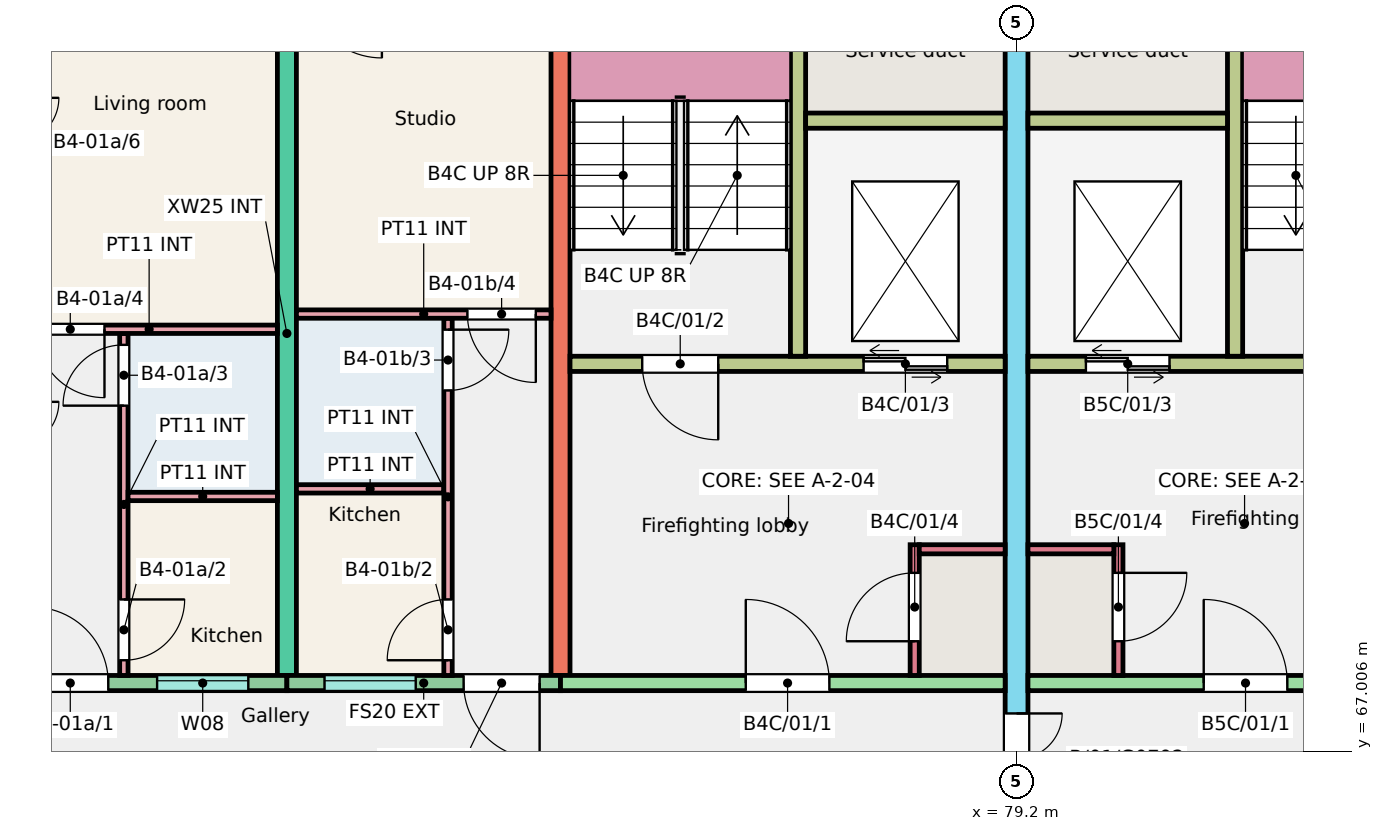
"""IFC4 building model, lengths in metres.
Left out: names, types, materials, properties, quantities, classifications, styles, units other than length and angle.
Written with IfcOpenShell. Run it as: python <this file> out.ifc"""

import sys

from ifc_helpers import new_model, si_unit, direction, frame, frame_2d, origin, place, context, subcontext, project, spatial, rectangle, extrude, element, fill, save


model = new_model("IFC4")
c1 = context("Model", 3, precision=1e-05, world=origin(), true_north=direction((0.0, 1.0)))
c2 = subcontext(c1, "Body", "Model", "MODEL_VIEW")
j1 = project(units=[si_unit("LENGTHUNIT", "METRE"), si_unit("PLANEANGLEUNIT", "RADIAN")], contexts=[c1])
p1 = place(None, origin())
s1 = spatial("IfcSite", under=j1, at=p1, CompositionType="ELEMENT")
p2 = place(p1, origin())
s2 = spatial("IfcBuilding", under=s1, at=p2, CompositionType="ELEMENT")
p3 = place(p2, frame((0.0, 0.0, 3.0)))
s3 = spatial("IfcBuildingStorey", under=s2, at=p3, CompositionType="ELEMENT", Elevation=3.0)
for number, where, z_axis, x_axis in (
    (1, (69.6, 68.0, 0.0), (0.0, 0.0, 1.0), (0.0, 1.0, 0.0)),
    (2, (73.2, 68.0, 0.0), (0.0, 0.0, 1.0), (0.0, 1.0, 0.0)),
):
    element("IfcWall", number, at=place(p3, frame(where, z_axis=z_axis, x_axis=x_axis)), inside=s3, PredefinedType="SHEAR", context=c2, shape_type="SweptSolid", body=[
        extrude(rectangle(XDim=9.0, YDim=0.25, at=frame_2d((4.5, 0.0))), origin(), (0.0, 0.0, 1.0), 3.0),
    ])
p4 = place(p3, frame((79.2, 66.0, 0.0), z_axis=(0.0, 0.0, 1.0), x_axis=(0.0, 1.0, 0.0)))
e3 = element("IfcWall", 3, at=p4, inside=s3, PredefinedType="SHEAR", context=c2, shape_type="SweptSolid", body=[
    extrude(rectangle(XDim=11.0, YDim=0.3, at=frame_2d((5.5, 0.0))), origin(), (0.0, 0.0, 1.0), 3.0),
])
p5 = place(p4, frame((0.3, 0.0, 0.0)))
e4 = element("IfcOpeningElement", 4, at=p5, cuts=e3, PredefinedType="OPENING", context=c2, shape_type="SweptSolid", body=[
    extrude(rectangle(XDim=1.2, YDim=2.1, at=frame_2d((0.6, 1.05))), frame((0.0, 0.16, 0.0), z_axis=(0.0, -1.0, 0.0), x_axis=(1.0, 0.0, 0.0)), (0.0, 0.0, 1.0), 0.32),
])
p6 = place(p3, frame((66.0, 67.9, 0.0), z_axis=(0.0, 0.0, 1.0), x_axis=(1.0, 0.0, 0.0)))
e5 = element("IfcWall", 5, at=p6, inside=s3, PredefinedType="SOLIDWALL", context=c2, shape_type="SweptSolid", body=[
    extrude(rectangle(XDim=3.6, YDim=0.2, at=frame_2d((1.8, 0.0))), origin(), (0.0, 0.0, 1.0), 3.0),
])
p7 = place(p6, frame((1.893, 0.0, 1.1)))
e6 = element("IfcOpeningElement", 6, at=p7, cuts=e5, PredefinedType="OPENING", context=c2, shape_type="SweptSolid", body=[
    extrude(rectangle(XDim=1.2, YDim=1.3, at=frame_2d((0.6, 0.65))), frame((0.0, 0.11, 0.0), z_axis=(0.0, -1.0, 0.0), x_axis=(1.0, 0.0, 0.0)), (0.0, 0.0, 1.0), 0.22),
])
p8 = place(p6, frame((0.25, 0.0, 0.0)))
e7 = element("IfcOpeningElement", 7, at=p8, cuts=e5, PredefinedType="OPENING", context=c2, shape_type="SweptSolid", body=[
    extrude(rectangle(XDim=1.0, YDim=2.1, at=frame_2d((0.5, 1.05))), frame((0.0, 0.11, 0.0), z_axis=(0.0, -1.0, 0.0), x_axis=(1.0, 0.0, 0.0)), (0.0, 0.0, 1.0), 0.22),
])
p9 = place(p3, frame((69.6, 67.9, 0.0), z_axis=(0.0, 0.0, 1.0), x_axis=(1.0, 0.0, 0.0)))
e8 = element("IfcWall", 8, at=p9, inside=s3, PredefinedType="SOLIDWALL", context=c2, shape_type="SweptSolid", body=[
    extrude(rectangle(XDim=3.6, YDim=0.2, at=frame_2d((1.8, 0.0))), origin(), (0.0, 0.0, 1.0), 3.0),
])
p10 = place(p9, frame((0.495, 0.0, 1.1)))
e9 = element("IfcOpeningElement", 9, at=p10, cuts=e8, PredefinedType="OPENING", context=c2, shape_type="SweptSolid", body=[
    extrude(rectangle(XDim=1.2, YDim=1.3, at=frame_2d((0.6, 0.65))), frame((0.0, 0.11, 0.0), z_axis=(0.0, -1.0, 0.0), x_axis=(1.0, 0.0, 0.0)), (0.0, 0.0, 1.0), 0.22),
])
p11 = place(p9, frame((2.325, 0.0, 0.0)))
e10 = element("IfcOpeningElement", 10, at=p11, cuts=e8, PredefinedType="OPENING", context=c2, shape_type="SweptSolid", body=[
    extrude(rectangle(XDim=1.0, YDim=2.1, at=frame_2d((0.5, 1.05))), frame((0.0, 0.11, 0.0), z_axis=(0.0, -1.0, 0.0), x_axis=(1.0, 0.0, 0.0)), (0.0, 0.0, 1.0), 0.22),
])
p12 = place(p3, frame((73.2, 67.9, 0.0), z_axis=(0.0, 0.0, 1.0), x_axis=(1.0, 0.0, 0.0)))
e11 = element("IfcWall", 11, at=p12, inside=s3, PredefinedType="SHEAR", context=c2, shape_type="SweptSolid", body=[
    extrude(rectangle(XDim=5.85, YDim=0.2, at=frame_2d((2.925, 0.0))), origin(), (0.0, 0.0, 1.0), 3.0),
])
p13 = place(p12, frame((2.438, 0.0, 0.0)))
e12 = element("IfcOpeningElement", 12, at=p13, cuts=e11, PredefinedType="OPENING", context=c2, shape_type="SweptSolid", body=[
    extrude(rectangle(XDim=1.1, YDim=2.1, at=frame_2d((0.55, 1.05))), frame((0.0, 0.11, 0.0), z_axis=(0.0, -1.0, 0.0), x_axis=(1.0, 0.0, 0.0)), (0.0, 0.0, 1.0), 0.22),
])
p14 = place(p3, frame((73.325, 72.1, 0.0), z_axis=(0.0, 0.0, 1.0), x_axis=(1.0, 0.0, 0.0)))
e13 = element("IfcWall", 13, at=p14, inside=s3, PredefinedType="SHEAR", context=c2, shape_type="SweptSolid", body=[
    extrude(rectangle(XDim=5.725, YDim=0.2, at=frame_2d((2.863, 0.0))), origin(), (0.0, 0.0, 1.0), 3.0),
])
p15 = place(p14, frame((0.95, 0.0, 0.0)))
e14 = element("IfcOpeningElement", 14, at=p15, cuts=e13, PredefinedType="OPENING", context=c2, shape_type="SweptSolid", body=[
    extrude(rectangle(XDim=1.0, YDim=2.1, at=frame_2d((0.5, 1.05))), frame((0.0, 0.11, 0.0), z_axis=(0.0, -1.0, 0.0), x_axis=(1.0, 0.0, 0.0)), (0.0, 0.0, 1.0), 0.22),
])
p16 = place(p14, frame((3.863, 0.0, 0.0)))
e15 = element("IfcOpeningElement", 15, at=p16, cuts=e13, PredefinedType="OPENING", context=c2, shape_type="SweptSolid", body=[
    extrude(rectangle(XDim=1.1, YDim=2.1, at=frame_2d((0.55, 1.05))), frame((0.0, 0.11, 0.0), z_axis=(0.0, -1.0, 0.0), x_axis=(1.0, 0.0, 0.0)), (0.0, 0.0, 1.0), 0.22),
])
p17 = place(p3, frame((76.325, 72.2, 0.0), z_axis=(0.0, 0.0, 1.0), x_axis=(0.0, 1.0, 0.0)))
e16 = element("IfcWall", 16, at=p17, inside=s3, PredefinedType="SHEAR", context=c2, shape_type="SweptSolid", body=[
    extrude(rectangle(XDim=4.8, YDim=0.2, at=frame_2d((2.4, 0.0))), origin(), (0.0, 0.0, 1.0), 3.0),
])
p18 = place(p3, frame((76.425, 75.3, 0.0), z_axis=(0.0, 0.0, 1.0), x_axis=(1.0, 0.0, 0.0)))
e17 = element("IfcWall", 17, at=p18, inside=s3, PredefinedType="SHEAR", context=c2, shape_type="SweptSolid", body=[
    extrude(rectangle(XDim=2.625, YDim=0.2, at=frame_2d((1.312, 0.0))), origin(), (0.0, 0.0, 1.0), 3.0),
])
p19 = place(p3, frame((77.86, 68.0, 0.0), z_axis=(0.0, 0.0, 1.0), x_axis=(0.0, 1.0, 0.0)))
e18 = element("IfcWall", 18, at=p19, inside=s3, PredefinedType="SHEAR", context=c2, shape_type="SweptSolid", body=[
    extrude(rectangle(XDim=1.72, YDim=0.12, at=frame_2d((0.86, 0.0))), origin(), (0.0, 0.0, 1.0), 3.0),
])
p20 = place(p19, frame((0.45, 0.0, 0.0)))
e19 = element("IfcOpeningElement", 19, at=p20, cuts=e18, PredefinedType="OPENING", context=c2, shape_type="SweptSolid", body=[
    extrude(rectangle(XDim=0.9, YDim=2.1, at=frame_2d((0.45, 1.05))), frame((0.0, 0.07, 0.0), z_axis=(0.0, -1.0, 0.0), x_axis=(1.0, 0.0, 0.0)), (0.0, 0.0, 1.0), 0.14),
])
p21 = place(p3, frame((77.92, 69.66, 0.0), z_axis=(0.0, 0.0, 1.0), x_axis=(1.0, 0.0, 0.0)))
e20 = element("IfcWall", 20, at=p21, inside=s3, PredefinedType="SHEAR", context=c2, shape_type="SweptSolid", body=[
    extrude(rectangle(XDim=1.13, YDim=0.12, at=frame_2d((0.565, 0.0))), origin(), (0.0, 0.0, 1.0), 3.0),
])
p22 = place(p3, frame((79.35, 67.9, 0.0), z_axis=(0.0, 0.0, 1.0), x_axis=(1.0, 0.0, 0.0)))
e21 = element("IfcWall", 21, at=p22, inside=s3, PredefinedType="SHEAR", context=c2, shape_type="SweptSolid", body=[
    extrude(rectangle(XDim=5.85, YDim=0.2, at=frame_2d((2.925, 0.0))), origin(), (0.0, 0.0, 1.0), 3.0),
])
p23 = place(p22, frame((2.312, 0.0, 0.0)))
e22 = element("IfcOpeningElement", 22, at=p23, cuts=e21, PredefinedType="OPENING", context=c2, shape_type="SweptSolid", body=[
    extrude(rectangle(XDim=1.1, YDim=2.1, at=frame_2d((0.55, 1.05))), frame((0.0, 0.11, 0.0), z_axis=(0.0, -1.0, 0.0), x_axis=(1.0, 0.0, 0.0)), (0.0, 0.0, 1.0), 0.22),
])
p24 = place(p3, frame((79.35, 72.1, 0.0), z_axis=(0.0, 0.0, 1.0), x_axis=(1.0, 0.0, 0.0)))
e23 = element("IfcWall", 23, at=p24, inside=s3, PredefinedType="SHEAR", context=c2, shape_type="SweptSolid", body=[
    extrude(rectangle(XDim=5.725, YDim=0.2, at=frame_2d((2.862, 0.0))), origin(), (0.0, 0.0, 1.0), 3.0),
])
p25 = place(p24, frame((3.775, 0.0, 0.0)))
e24 = element("IfcOpeningElement", 24, at=p25, cuts=e23, PredefinedType="OPENING", context=c2, shape_type="SweptSolid", body=[
    extrude(rectangle(XDim=1.0, YDim=2.1, at=frame_2d((0.5, 1.05))), frame((0.0, 0.11, 0.0), z_axis=(0.0, -1.0, 0.0), x_axis=(1.0, 0.0, 0.0)), (0.0, 0.0, 1.0), 0.22),
])
p26 = place(p24, frame((0.762, 0.0, 0.0)))
e25 = element("IfcOpeningElement", 25, at=p26, cuts=e23, PredefinedType="OPENING", context=c2, shape_type="SweptSolid", body=[
    extrude(rectangle(XDim=1.1, YDim=2.1, at=frame_2d((0.55, 1.05))), frame((0.0, 0.11, 0.0), z_axis=(0.0, -1.0, 0.0), x_axis=(1.0, 0.0, 0.0)), (0.0, 0.0, 1.0), 0.22),
])
p27 = place(p3, frame((82.075, 72.2, 0.0), z_axis=(0.0, 0.0, 1.0), x_axis=(0.0, 1.0, 0.0)))
e26 = element("IfcWall", 26, at=p27, inside=s3, PredefinedType="SHEAR", context=c2, shape_type="SweptSolid", body=[
    extrude(rectangle(XDim=4.8, YDim=0.2, at=frame_2d((2.4, 0.0))), origin(), (0.0, 0.0, 1.0), 3.0),
])
p28 = place(p3, frame((79.35, 75.3, 0.0), z_axis=(0.0, 0.0, 1.0), x_axis=(1.0, 0.0, 0.0)))
e27 = element("IfcWall", 27, at=p28, inside=s3, PredefinedType="SHEAR", context=c2, shape_type="SweptSolid", body=[
    extrude(rectangle(XDim=2.625, YDim=0.2, at=frame_2d((1.312, 0.0))), origin(), (0.0, 0.0, 1.0), 3.0),
])
p29 = place(p3, frame((80.54, 68.0, 0.0), z_axis=(0.0, 0.0, 1.0), x_axis=(0.0, 1.0, 0.0)))
e28 = element("IfcWall", 28, at=p29, inside=s3, PredefinedType="SHEAR", context=c2, shape_type="SweptSolid", body=[
    extrude(rectangle(XDim=1.72, YDim=0.12, at=frame_2d((0.86, 0.0))), origin(), (0.0, 0.0, 1.0), 3.0),
])
p30 = place(p29, frame((0.45, 0.0, 0.0)))
e29 = element("IfcOpeningElement", 29, at=p30, cuts=e28, PredefinedType="OPENING", context=c2, shape_type="SweptSolid", body=[
    extrude(rectangle(XDim=0.9, YDim=2.1, at=frame_2d((0.45, 1.05))), frame((0.0, 0.07, 0.0), z_axis=(0.0, -1.0, 0.0), x_axis=(1.0, 0.0, 0.0)), (0.0, 0.0, 1.0), 0.14),
])
p31 = place(p3, frame((79.35, 69.66, 0.0), z_axis=(0.0, 0.0, 1.0), x_axis=(1.0, 0.0, 0.0)))
e30 = element("IfcWall", 30, at=p31, inside=s3, PredefinedType="SHEAR", context=c2, shape_type="SweptSolid", body=[
    extrude(rectangle(XDim=1.13, YDim=0.12, at=frame_2d((0.565, 0.0))), origin(), (0.0, 0.0, 1.0), 3.0),
])
p32 = place(p3, frame((67.455, 68.0, 0.0), z_axis=(0.0, 0.0, 1.0), x_axis=(0.0, 1.0, 0.0)))
e31 = element("IfcWall", 31, at=p32, inside=s3, PredefinedType="PARTITIONING", context=c2, shape_type="SweptSolid", body=[
    extrude(rectangle(XDim=4.5, YDim=0.11, at=frame_2d((2.25, 0.0))), origin(), (0.0, 0.0, 1.0), 2.8),
])
p33 = place(p32, frame((0.2, 0.0, 0.0)))
e32 = element("IfcOpeningElement", 32, at=p33, cuts=e31, PredefinedType="OPENING", context=c2, shape_type="SweptSolid", body=[
    extrude(rectangle(XDim=0.8, YDim=2.1, at=frame_2d((0.4, 1.05))), frame((0.0, 0.065, 0.0), z_axis=(0.0, -1.0, 0.0), x_axis=(1.0, 0.0, 0.0)), (0.0, 0.0, 1.0), 0.13),
])
p34 = place(p32, frame((3.55, 0.0, 0.0)))
e33 = element("IfcOpeningElement", 33, at=p34, cuts=e31, PredefinedType="OPENING", context=c2, shape_type="SweptSolid", body=[
    extrude(rectangle(XDim=0.8, YDim=2.1, at=frame_2d((0.4, 1.05))), frame((0.0, 0.065, 0.0), z_axis=(0.0, -1.0, 0.0), x_axis=(1.0, 0.0, 0.0)), (0.0, 0.0, 1.0), 0.13),
])
p35 = place(p3, frame((67.51, 70.355, 0.0), z_axis=(0.0, 0.0, 1.0), x_axis=(1.0, 0.0, 0.0)))
e34 = element("IfcWall", 34, at=p35, inside=s3, PredefinedType="PARTITIONING", context=c2, shape_type="SweptSolid", body=[
    extrude(rectangle(XDim=1.965, YDim=0.11, at=frame_2d((0.982, 0.0))), origin(), (0.0, 0.0, 1.0), 2.8),
])
p36 = place(p3, frame((66.1, 72.555, 0.0), z_axis=(0.0, 0.0, 1.0), x_axis=(1.0, 0.0, 0.0)))
e35 = element("IfcWall", 35, at=p36, inside=s3, PredefinedType="PARTITIONING", context=c2, shape_type="SweptSolid", body=[
    extrude(rectangle(XDim=3.375, YDim=0.11, at=frame_2d((1.688, 0.0))), origin(), (0.0, 0.0, 1.0), 2.8),
])
p37 = place(p36, frame((0.2, 0.0, 0.0)))
e36 = element("IfcOpeningElement", 36, at=p37, cuts=e35, PredefinedType="OPENING", context=c2, shape_type="SweptSolid", body=[
    extrude(rectangle(XDim=0.9, YDim=2.1, at=frame_2d((0.45, 1.05))), frame((0.0, 0.065, 0.0), z_axis=(0.0, -1.0, 0.0), x_axis=(1.0, 0.0, 0.0)), (0.0, 0.0, 1.0), 0.13),
])
p38 = place(p3, frame((69.725, 70.455, 0.0), z_axis=(0.0, 0.0, 1.0), x_axis=(1.0, 0.0, 0.0)))
e37 = element("IfcWall", 37, at=p38, inside=s3, PredefinedType="PARTITIONING", context=c2, shape_type="SweptSolid", body=[
    extrude(rectangle(XDim=1.94, YDim=0.11, at=frame_2d((0.97, 0.0))), origin(), (0.0, 0.0, 1.0), 2.8),
])
p39 = place(p3, frame((71.72, 68.0, 0.0), z_axis=(0.0, 0.0, 1.0), x_axis=(0.0, 1.0, 0.0)))
e38 = element("IfcWall", 38, at=p39, inside=s3, PredefinedType="PARTITIONING", context=c2, shape_type="SweptSolid", body=[
    extrude(rectangle(XDim=4.7, YDim=0.11, at=frame_2d((2.35, 0.0))), origin(), (0.0, 0.0, 1.0), 2.8),
])
p40 = place(p39, frame((0.2, 0.0, 0.0)))
e39 = element("IfcOpeningElement", 39, at=p40, cuts=e38, PredefinedType="OPENING", context=c2, shape_type="SweptSolid", body=[
    extrude(rectangle(XDim=0.8, YDim=2.1, at=frame_2d((0.4, 1.05))), frame((0.0, 0.065, 0.0), z_axis=(0.0, -1.0, 0.0), x_axis=(1.0, 0.0, 0.0)), (0.0, 0.0, 1.0), 0.13),
])
p41 = place(p39, frame((3.75, 0.0, 0.0)))
e40 = element("IfcOpeningElement", 40, at=p41, cuts=e38, PredefinedType="OPENING", context=c2, shape_type="SweptSolid", body=[
    extrude(rectangle(XDim=0.8, YDim=2.1, at=frame_2d((0.4, 1.05))), frame((0.0, 0.065, 0.0), z_axis=(0.0, -1.0, 0.0), x_axis=(1.0, 0.0, 0.0)), (0.0, 0.0, 1.0), 0.13),
])
p42 = place(p3, frame((69.725, 72.755, 0.0), z_axis=(0.0, 0.0, 1.0), x_axis=(1.0, 0.0, 0.0)))
e41 = element("IfcWall", 41, at=p42, inside=s3, PredefinedType="PARTITIONING", context=c2, shape_type="SweptSolid", body=[
    extrude(rectangle(XDim=3.35, YDim=0.11, at=frame_2d((1.675, 0.0))), origin(), (0.0, 0.0, 1.0), 2.8),
])
p43 = place(p42, frame((2.25, 0.0, 0.0)))
e42 = element("IfcOpeningElement", 42, at=p43, cuts=e41, PredefinedType="OPENING", context=c2, shape_type="SweptSolid", body=[
    extrude(rectangle(XDim=0.9, YDim=2.1, at=frame_2d((0.45, 1.05))), frame((0.0, 0.065, 0.0), z_axis=(0.0, -1.0, 0.0), x_axis=(1.0, 0.0, 0.0)), (0.0, 0.0, 1.0), 0.13),
])
p44 = place(p7, origin())
e43 = element("IfcWindow", 43, at=p44, inside=s3, PartitioningType="SINGLE_PANEL", PredefinedType="WINDOW", context=c2, shape_type="SweptSolid", body=[
    extrude(rectangle(XDim=1.2, YDim=1.3, at=frame_2d((0.6, 0.65))), frame((0.0, 0.06, 0.0), z_axis=(0.0, -1.0, 0.0), x_axis=(1.0, 0.0, 0.0)), (0.0, 0.0, 1.0), 0.06),
])
fill(e6, e43)
p45 = place(p10, origin())
e44 = element("IfcWindow", 44, at=p45, inside=s3, PartitioningType="SINGLE_PANEL", PredefinedType="WINDOW", context=c2, shape_type="SweptSolid", body=[
    extrude(rectangle(XDim=1.2, YDim=1.3, at=frame_2d((0.6, 0.65))), frame((0.0, 0.06, 0.0), z_axis=(0.0, -1.0, 0.0), x_axis=(1.0, 0.0, 0.0)), (0.0, 0.0, 1.0), 0.06),
])
fill(e9, e44)
p46 = place(p8, origin())
e45 = element("IfcDoor", 45, at=p46, inside=s3, OperationType="SINGLE_SWING_LEFT", PredefinedType="DOOR", context=c2, shape_type="SweptSolid", body=[
    extrude(rectangle(XDim=1.0, YDim=2.1, at=frame_2d((0.5, 1.05))), frame((0.0, 0.025, 0.0), z_axis=(0.0, -1.0, 0.0), x_axis=(1.0, 0.0, 0.0)), (0.0, 0.0, 1.0), 0.05),
])
fill(e7, e45)
p47 = place(p33, origin())
e46 = element("IfcDoor", 46, at=p47, inside=s3, OperationType="SINGLE_SWING_RIGHT", PredefinedType="DOOR", context=c2, shape_type="SweptSolid", body=[
    extrude(rectangle(XDim=0.8, YDim=2.1, at=frame_2d((0.4, 1.05))), frame((0.0, 0.025, 0.0), z_axis=(0.0, -1.0, 0.0), x_axis=(1.0, 0.0, 0.0)), (0.0, 0.0, 1.0), 0.05),
])
fill(e32, e46)
p48 = place(p34, origin())
e47 = element("IfcDoor", 47, at=p48, inside=s3, OperationType="SINGLE_SWING_LEFT", PredefinedType="DOOR", context=c2, shape_type="SweptSolid", body=[
    extrude(rectangle(XDim=0.8, YDim=2.1, at=frame_2d((0.4, 1.05))), frame((0.0, 0.025, 0.0), z_axis=(0.0, -1.0, 0.0), x_axis=(1.0, 0.0, 0.0)), (0.0, 0.0, 1.0), 0.05),
])
fill(e33, e47)
p49 = place(p37, origin())
e48 = element("IfcDoor", 48, at=p49, inside=s3, OperationType="SINGLE_SWING_RIGHT", PredefinedType="DOOR", context=c2, shape_type="SweptSolid", body=[
    extrude(rectangle(XDim=0.9, YDim=2.1, at=frame_2d((0.45, 1.05))), frame((0.0, 0.025, 0.0), z_axis=(0.0, -1.0, 0.0), x_axis=(1.0, 0.0, 0.0)), (0.0, 0.0, 1.0), 0.05),
])
fill(e36, e48)
p50 = place(p11, origin())
e49 = element("IfcDoor", 49, at=p50, inside=s3, OperationType="SINGLE_SWING_RIGHT", PredefinedType="DOOR", context=c2, shape_type="SweptSolid", body=[
    extrude(rectangle(XDim=1.0, YDim=2.1, at=frame_2d((0.5, 1.05))), frame((0.0, 0.025, 0.0), z_axis=(0.0, -1.0, 0.0), x_axis=(1.0, 0.0, 0.0)), (0.0, 0.0, 1.0), 0.05),
])
fill(e10, e49)
p51 = place(p40, origin())
e50 = element("IfcDoor", 50, at=p51, inside=s3, OperationType="SINGLE_SWING_LEFT", PredefinedType="DOOR", context=c2, shape_type="SweptSolid", body=[
    extrude(rectangle(XDim=0.8, YDim=2.1, at=frame_2d((0.4, 1.05))), frame((0.0, 0.025, 0.0), z_axis=(0.0, -1.0, 0.0), x_axis=(1.0, 0.0, 0.0)), (0.0, 0.0, 1.0), 0.05),
])
fill(e39, e50)
p52 = place(p41, origin())
e51 = element("IfcDoor", 51, at=p52, inside=s3, OperationType="SINGLE_SWING_RIGHT", PredefinedType="DOOR", context=c2, shape_type="SweptSolid", body=[
    extrude(rectangle(XDim=0.8, YDim=2.1, at=frame_2d((0.4, 1.05))), frame((0.0, 0.025, 0.0), z_axis=(0.0, -1.0, 0.0), x_axis=(1.0, 0.0, 0.0)), (0.0, 0.0, 1.0), 0.05),
])
fill(e40, e51)
p53 = place(p43, origin())
e52 = element("IfcDoor", 52, at=p53, inside=s3, OperationType="SINGLE_SWING_RIGHT", PredefinedType="DOOR", context=c2, shape_type="SweptSolid", body=[
    extrude(rectangle(XDim=0.9, YDim=2.1, at=frame_2d((0.45, 1.05))), frame((0.0, 0.025, 0.0), z_axis=(0.0, -1.0, 0.0), x_axis=(1.0, 0.0, 0.0)), (0.0, 0.0, 1.0), 0.05),
])
fill(e42, e52)
p54 = place(p13, origin())
e53 = element("IfcDoor", 53, at=p54, inside=s3, OperationType="SINGLE_SWING_LEFT", PredefinedType="DOOR", context=c2, shape_type="SweptSolid", body=[
    extrude(rectangle(XDim=1.1, YDim=2.1, at=frame_2d((0.55, 1.05))), frame((0.0, 0.025, 0.0), z_axis=(0.0, -1.0, 0.0), x_axis=(1.0, 0.0, 0.0)), (0.0, 0.0, 1.0), 0.05),
])
fill(e12, e53)
p55 = place(p15, origin())
e54 = element("IfcDoor", 54, at=p55, inside=s3, OperationType="SINGLE_SWING_RIGHT", PredefinedType="DOOR", context=c2, shape_type="SweptSolid", body=[
    extrude(rectangle(XDim=1.0, YDim=2.1, at=frame_2d((0.5, 1.05))), frame((0.0, 0.025, 0.0), z_axis=(0.0, -1.0, 0.0), x_axis=(1.0, 0.0, 0.0)), (0.0, 0.0, 1.0), 0.05),
])
fill(e14, e54)
p56 = place(p16, origin())
e55 = element("IfcDoor", 55, at=p56, inside=s3, OperationType="DOUBLE_DOOR_SLIDING", PredefinedType="DOOR", context=c2, shape_type="SweptSolid", body=[
    extrude(rectangle(XDim=1.1, YDim=2.1, at=frame_2d((0.55, 1.05))), frame((0.0, 0.025, 0.0), z_axis=(0.0, -1.0, 0.0), x_axis=(1.0, 0.0, 0.0)), (0.0, 0.0, 1.0), 0.05),
])
fill(e15, e55)
p57 = place(p20, origin())
e56 = element("IfcDoor", 56, at=p57, inside=s3, OperationType="SINGLE_SWING_LEFT", PredefinedType="DOOR", context=c2, shape_type="SweptSolid", body=[
    extrude(rectangle(XDim=0.9, YDim=2.1, at=frame_2d((0.45, 1.05))), frame((0.0, 0.025, 0.0), z_axis=(0.0, -1.0, 0.0), x_axis=(1.0, 0.0, 0.0)), (0.0, 0.0, 1.0), 0.05),
])
fill(e19, e56)
p58 = place(p23, origin())
e57 = element("IfcDoor", 57, at=p58, inside=s3, OperationType="SINGLE_SWING_LEFT", PredefinedType="DOOR", context=c2, shape_type="SweptSolid", body=[
    extrude(rectangle(XDim=1.1, YDim=2.1, at=frame_2d((0.55, 1.05))), frame((0.0, 0.025, 0.0), z_axis=(0.0, -1.0, 0.0), x_axis=(1.0, 0.0, 0.0)), (0.0, 0.0, 1.0), 0.05),
])
fill(e22, e57)
p59 = place(p26, origin())
e58 = element("IfcDoor", 58, at=p59, inside=s3, OperationType="DOUBLE_DOOR_SLIDING", PredefinedType="DOOR", context=c2, shape_type="SweptSolid", body=[
    extrude(rectangle(XDim=1.1, YDim=2.1, at=frame_2d((0.55, 1.05))), frame((0.0, 0.025, 0.0), z_axis=(0.0, -1.0, 0.0), x_axis=(1.0, 0.0, 0.0)), (0.0, 0.0, 1.0), 0.05),
])
fill(e25, e58)
p60 = place(p30, origin())
e59 = element("IfcDoor", 59, at=p60, inside=s3, OperationType="SINGLE_SWING_RIGHT", PredefinedType="DOOR", context=c2, shape_type="SweptSolid", body=[
    extrude(rectangle(XDim=0.9, YDim=2.1, at=frame_2d((0.45, 1.05))), frame((0.0, 0.025, 0.0), z_axis=(0.0, -1.0, 0.0), x_axis=(1.0, 0.0, 0.0)), (0.0, 0.0, 1.0), 0.05),
])
fill(e29, e59)
p61 = place(p5, origin())
e60 = element("IfcDoor", 60, at=p61, inside=s3, OperationType="DOUBLE_DOOR_SINGLE_SWING", PredefinedType="DOOR", context=c2, shape_type="SweptSolid", body=[
    extrude(rectangle(XDim=1.2, YDim=2.1, at=frame_2d((0.6, 1.05))), frame((0.0, 0.025, 0.0), z_axis=(0.0, -1.0, 0.0), x_axis=(1.0, 0.0, 0.0)), (0.0, 0.0, 1.0), 0.05),
])
fill(e4, e60)
save(model, sys.argv[1])
